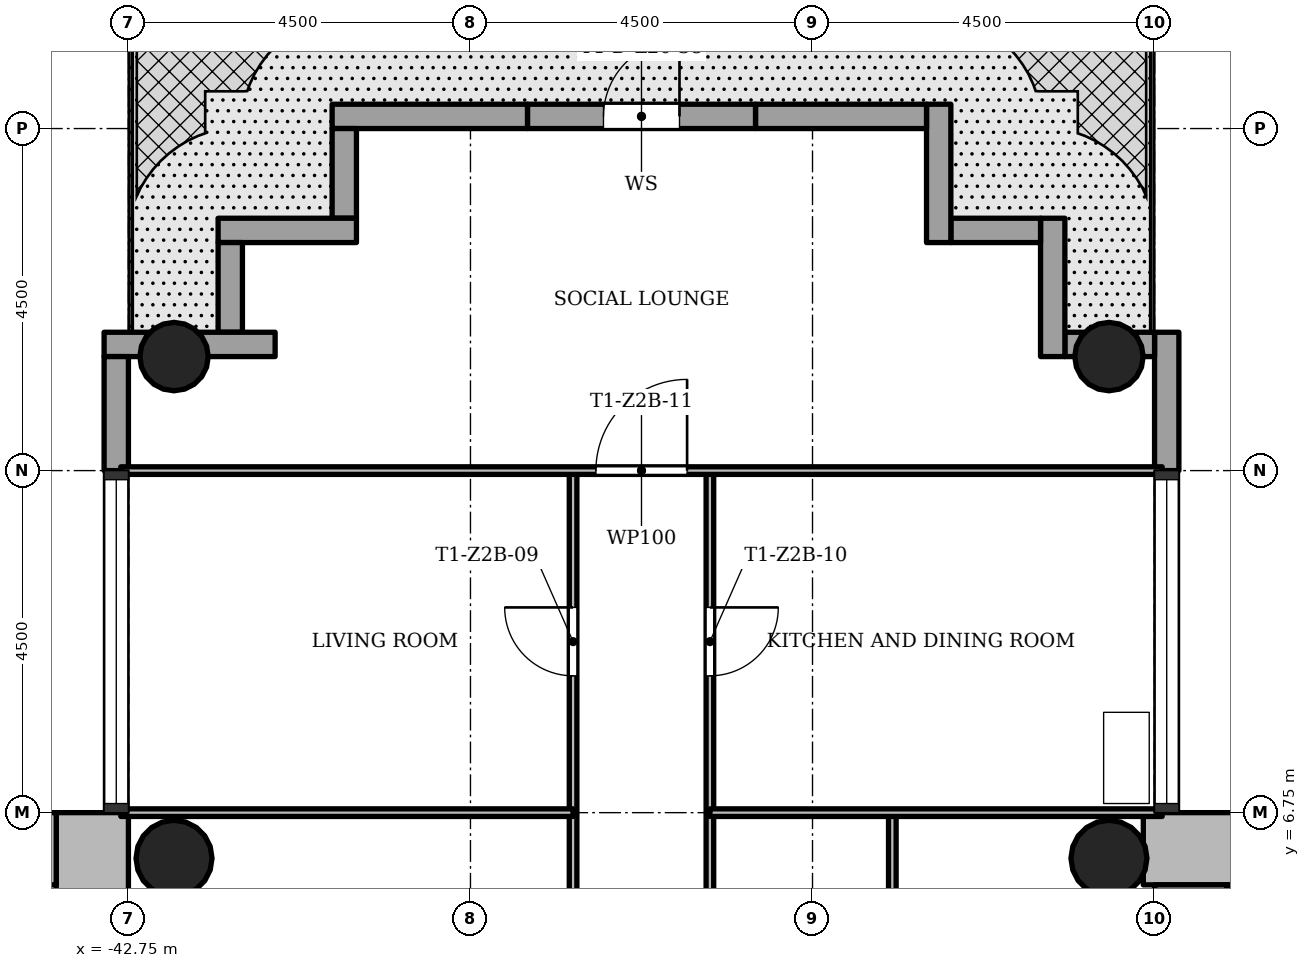
"""IFC4 building model, lengths in metres.
Left out: names, types, materials, properties, quantities, classifications, styles, units other than length and angle.
Written with IfcOpenShell. Run it as: python <this file> out.ifc"""

import sys

from ifc_helpers import new_model, si_unit, direction, frame, frame_2d, origin, origin_2d, place, context, subcontext, project, spatial, rectangle, hollow_circle, extrude, element, fill, save


model = new_model("IFC4")
c1 = context("Model", 3, precision=1e-05, world=origin(), true_north=direction((0.0, 1.0)))
c2 = subcontext(c1, "Body", "Model", "MODEL_VIEW")
j1 = project(units=[si_unit("LENGTHUNIT", "METRE"), si_unit("PLANEANGLEUNIT", "RADIAN")], contexts=[c1])
p1 = place(None, origin())
s1 = spatial("IfcSite", under=j1, at=p1, CompositionType="ELEMENT")
p2 = place(p1, origin())
s2 = spatial("IfcBuilding", under=s1, at=p2, CompositionType="ELEMENT")
p3 = place(p2, frame((0.0, 0.0, 76.6)))
s3 = spatial("IfcBuildingStorey", under=s2, at=p3, CompositionType="ELEMENT", Elevation=76.6)
p4 = place(p3, frame((-20.702, 6.275, 0.0), z_axis=(0.0, 0.0, 1.0), x_axis=(-1.0, 0.0, 0.0)))
e1 = element("IfcWall", 1, at=p4, inside=s3, PredefinedType="SHEAR", context=c2, shape_type="SweptSolid", body=[
    extrude(rectangle(XDim=8.696, YDim=0.95, at=frame_2d((4.348, 0.0))), origin(), (0.0, 0.0, 1.0), 3.4),
])
p5 = place(p3, frame((-28.775, 5.8, 0.0), z_axis=(0.0, 0.0, 1.0), x_axis=(0.0, -1.0, 0.0)))
e2 = element("IfcWall", 2, at=p5, inside=s3, PredefinedType="SHEAR", context=c2, shape_type="SweptSolid", body=[
    extrude(rectangle(XDim=12.55, YDim=0.95, at=frame_2d((6.275, 0.0))), origin(), (0.0, 0.0, 1.0), 3.4),
])
p6 = place(p5, frame((4.9, 0.0, 0.0)))
e3 = element("IfcOpeningElement", 3, at=p6, cuts=e2, PredefinedType="OPENING", context=c2, shape_type="SweptSolid", body=[
    extrude(rectangle(XDim=1.8, YDim=2.1, at=frame_2d((0.9, 1.05))), frame((0.0, 0.485, 0.0), z_axis=(0.0, -1.0, 0.0), x_axis=(1.0, 0.0, 0.0)), (0.0, 0.0, 1.0), 0.97),
])
p7 = place(p3, frame((-43.225, -5.8, 0.0), z_axis=(0.0, 0.0, 1.0), x_axis=(0.0, 1.0, 0.0)))
e4 = element("IfcWall", 4, at=p7, inside=s3, PredefinedType="SHEAR", context=c2, shape_type="SweptSolid", body=[
    extrude(rectangle(XDim=12.55, YDim=0.95, at=frame_2d((6.275, 0.0))), origin(), (0.0, 0.0, 1.0), 3.4),
])
p8 = place(p7, frame((4.9, 0.0, 0.0)))
e5 = element("IfcOpeningElement", 5, at=p8, cuts=e4, PredefinedType="OPENING", context=c2, shape_type="SweptSolid", body=[
    extrude(rectangle(XDim=1.8, YDim=2.1, at=frame_2d((0.9, 1.05))), frame((0.0, 0.485, 0.0), z_axis=(0.0, -1.0, 0.0), x_axis=(1.0, 0.0, 0.0)), (0.0, 0.0, 1.0), 0.97),
])
p9 = place(p3, frame((-43.7, 6.275, 0.0), z_axis=(0.0, 0.0, 1.0), x_axis=(-1.0, 0.0, 0.0)))
e6 = element("IfcWall", 6, at=p9, inside=s3, PredefinedType="SHEAR", context=c2, shape_type="SweptSolid", body=[
    extrude(rectangle(XDim=8.05, YDim=0.95, at=frame_2d((4.025, 0.0))), origin(), (0.0, 0.0, 1.0), 3.4),
])
for number, where, z_axis, x_axis in (
    (7, (-29.85, 12.75, 0.0), (0.0, 0.0, 1.0), (1.0, 0.0, 0.0)),
    (8, (-42.15, 12.75, 0.0), (0.0, 0.0, 1.0), (1.0, 0.0, 0.0)),
):
    element("IfcColumn", number, at=place(p3, frame(where, z_axis=z_axis, x_axis=x_axis)), inside=s3, PredefinedType="COLUMN", context=c2, shape_type="SweptSolid", body=[
        extrude(hollow_circle(Radius=0.45, WallThickness=0.032, at=origin_2d()), origin(), (0.0, 0.0, 1.0), 3.4),
    ])
for number, where, z_axis, x_axis in (
    (9, (-29.85, 6.15, 0.0), (0.0, 0.0, 1.0), (1.0, 0.0, 0.0)),
    (10, (-42.15, 6.15, 0.0), (0.0, 0.0, 1.0), (1.0, 0.0, 0.0)),
):
    element("IfcColumn", number, at=place(p3, frame(where, z_axis=z_axis, x_axis=x_axis)), inside=s3, PredefinedType="COLUMN", context=c2, shape_type="SweptSolid", body=[
        extrude(hollow_circle(Radius=0.5, WallThickness=0.036, at=origin_2d()), origin(), (0.0, 0.0, 1.0), 3.4),
    ])
p10 = place(p3, frame((-29.09, 11.25, 0.0), z_axis=(0.0, 0.0, 1.0), x_axis=(0.0, 1.0, 0.0)))
e11 = element("IfcWall", 11, at=p10, inside=s3, PredefinedType="STANDARD", context=c2, shape_type="SweptSolid", body=[
    extrude(rectangle(XDim=1.82, YDim=0.32, at=frame_2d((0.91, 0.0))), origin(), (0.0, 0.0, 1.0), 3.1),
])
p11 = place(p3, frame((-29.25, 12.91, -0.02), z_axis=(0.0, 0.0, 1.0), x_axis=(-1.0, 0.0, 0.0)))
e12 = element("IfcWall", 12, at=p11, inside=s3, PredefinedType="STANDARD", context=c2, shape_type="SweptSolid", body=[
    extrude(rectangle(XDim=1.18, YDim=0.32, at=frame_2d((0.59, 0.0))), origin(), (0.0, 0.0, 1.0), 3.12),
])
p12 = place(p3, frame((-30.59, 12.75, -0.02), z_axis=(0.0, 0.0, 1.0), x_axis=(0.0, 1.0, 0.0)))
e13 = element("IfcWall", 13, at=p12, inside=s3, PredefinedType="STANDARD", context=c2, shape_type="SweptSolid", body=[
    extrude(rectangle(XDim=1.82, YDim=0.32, at=frame_2d((0.91, 0.0))), origin(), (0.0, 0.0, 1.0), 3.12),
])
p13 = place(p3, frame((-30.75, 14.41, -0.02), z_axis=(0.0, 0.0, 1.0), x_axis=(-1.0, 0.0, 0.0)))
e14 = element("IfcWall", 14, at=p13, inside=s3, PredefinedType="STANDARD", context=c2, shape_type="SweptSolid", body=[
    extrude(rectangle(XDim=1.18, YDim=0.32, at=frame_2d((0.59, 0.0))), origin(), (0.0, 0.0, 1.0), 3.12),
])
p14 = place(p3, frame((-32.09, 14.25, -0.02), z_axis=(0.0, 0.0, 1.0), x_axis=(0.0, 1.0, 0.0)))
e15 = element("IfcWall", 15, at=p14, inside=s3, PredefinedType="STANDARD", context=c2, shape_type="SweptSolid", body=[
    extrude(rectangle(XDim=1.82, YDim=0.32, at=frame_2d((0.91, 0.0))), origin(), (0.0, 0.0, 1.0), 3.12),
])
p15 = place(p3, frame((-32.25, 15.91, -0.02), z_axis=(0.0, 0.0, 1.0), x_axis=(-1.0, 0.0, 0.0)))
e16 = element("IfcWall", 16, at=p15, inside=s3, PredefinedType="STANDARD", context=c2, shape_type="SweptSolid", body=[
    extrude(rectangle(XDim=2.25, YDim=0.32, at=frame_2d((1.125, 0.0))), origin(), (0.0, 0.0, 1.0), 3.12),
])
p16 = place(p3, frame((-34.5, 15.91, -0.02), z_axis=(0.0, 0.0, 1.0), x_axis=(-1.0, 0.0, 0.0)))
e17 = element("IfcWall", 17, at=p16, inside=s3, PredefinedType="STANDARD", context=c2, shape_type="SweptSolid", body=[
    extrude(rectangle(XDim=3.0, YDim=0.32, at=frame_2d((1.5, 0.0))), origin(), (0.0, 0.0, 1.0), 3.12),
])
p17 = place(p16, frame((1.0, 0.0, 0.02)))
e18 = element("IfcOpeningElement", 18, at=p17, cuts=e17, PredefinedType="OPENING", context=c2, shape_type="SweptSolid", body=[
    extrude(rectangle(XDim=1.0, YDim=2.1, at=frame_2d((0.5, 1.05))), frame((0.0, 0.17, 0.0), z_axis=(0.0, -1.0, 0.0), x_axis=(1.0, 0.0, 0.0)), (0.0, 0.0, 1.0), 0.34),
])
p18 = place(p3, frame((-37.5, 15.91, -0.02), z_axis=(0.0, 0.0, 1.0), x_axis=(-1.0, 0.0, 0.0)))
e19 = element("IfcWall", 19, at=p18, inside=s3, PredefinedType="STANDARD", context=c2, shape_type="SweptSolid", body=[
    extrude(rectangle(XDim=2.57, YDim=0.32, at=frame_2d((1.285, 0.0))), origin(), (0.0, 0.0, 1.0), 3.12),
])
p19 = place(p3, frame((-39.91, 15.75, -0.02), z_axis=(0.0, 0.0, 1.0), x_axis=(0.0, -1.0, 0.0)))
e20 = element("IfcWall", 20, at=p19, inside=s3, PredefinedType="STANDARD", context=c2, shape_type="SweptSolid", body=[
    extrude(rectangle(XDim=1.18, YDim=0.32, at=frame_2d((0.59, 0.0))), origin(), (0.0, 0.0, 1.0), 3.12),
])
p20 = place(p3, frame((-39.75, 14.41, -0.02), z_axis=(0.0, 0.0, 1.0), x_axis=(-1.0, 0.0, 0.0)))
e21 = element("IfcWall", 21, at=p20, inside=s3, PredefinedType="STANDARD", context=c2, shape_type="SweptSolid", body=[
    extrude(rectangle(XDim=1.82, YDim=0.32, at=frame_2d((0.91, 0.0))), origin(), (0.0, 0.0, 1.0), 3.12),
])
p21 = place(p3, frame((-41.41, 14.25, -0.02), z_axis=(0.0, 0.0, 1.0), x_axis=(0.0, -1.0, 0.0)))
e22 = element("IfcWall", 22, at=p21, inside=s3, PredefinedType="STANDARD", context=c2, shape_type="SweptSolid", body=[
    extrude(rectangle(XDim=1.18, YDim=0.32, at=frame_2d((0.59, 0.0))), origin(), (0.0, 0.0, 1.0), 3.12),
])
p22 = place(p3, frame((-40.82, 12.91, -0.02), z_axis=(0.0, 0.0, 1.0), x_axis=(-1.0, 0.0, 0.0)))
e23 = element("IfcWall", 23, at=p22, inside=s3, PredefinedType="STANDARD", context=c2, shape_type="SweptSolid", body=[
    extrude(rectangle(XDim=2.25, YDim=0.32, at=frame_2d((1.125, 0.0))), origin(), (0.0, 0.0, 1.0), 3.12),
])
p23 = place(p3, frame((-42.91, 12.75, 0.0), z_axis=(0.0, 0.0, 1.0), x_axis=(0.0, -1.0, 0.0)))
e24 = element("IfcWall", 24, at=p23, inside=s3, PredefinedType="STANDARD", context=c2, shape_type="SweptSolid", body=[
    extrude(rectangle(XDim=1.5, YDim=0.32, at=frame_2d((0.75, 0.0))), origin(), (0.0, 0.0, 1.0), 3.1),
])
p24 = place(p3, frame((-36.9, 1.5, 0.0), z_axis=(0.0, 0.0, 1.0), x_axis=(0.0, 1.0, 0.0)))
e25 = element("IfcWall", 25, at=p24, inside=s3, PredefinedType="PARTITIONING", context=c2, shape_type="SweptSolid", body=[
    extrude(rectangle(XDim=9.75, YDim=0.1, at=frame_2d((4.875, 0.0))), origin(), (0.0, 0.0, 1.0), 3.0),
])
p25 = place(p24, frame((0.75, 0.0, 0.0)))
e26 = element("IfcOpeningElement", 26, at=p25, cuts=e25, PredefinedType="OPENING", context=c2, shape_type="SweptSolid", body=[
    extrude(rectangle(XDim=0.9, YDim=2.1, at=frame_2d((0.45, 1.05))), frame((0.0, 0.06, 0.0), z_axis=(0.0, -1.0, 0.0), x_axis=(1.0, 0.0, 0.0)), (0.0, 0.0, 1.0), 0.12),
])
p26 = place(p24, frame((7.05, 0.0, 0.0)))
e27 = element("IfcOpeningElement", 27, at=p26, cuts=e25, PredefinedType="OPENING", context=c2, shape_type="SweptSolid", body=[
    extrude(rectangle(XDim=0.9, YDim=2.1, at=frame_2d((0.45, 1.05))), frame((0.0, 0.06, 0.0), z_axis=(0.0, -1.0, 0.0), x_axis=(1.0, 0.0, 0.0)), (0.0, 0.0, 1.0), 0.12),
])
p27 = place(p3, frame((-35.1, 1.5, 0.0), z_axis=(0.0, 0.0, 1.0), x_axis=(0.0, 1.0, 0.0)))
e28 = element("IfcWall", 28, at=p27, inside=s3, PredefinedType="PARTITIONING", context=c2, shape_type="SweptSolid", body=[
    extrude(rectangle(XDim=9.75, YDim=0.1, at=frame_2d((4.875, 0.0))), origin(), (0.0, 0.0, 1.0), 3.0),
])
p28 = place(p27, frame((2.175, 0.0, 0.0)))
e29 = element("IfcOpeningElement", 29, at=p28, cuts=e28, PredefinedType="OPENING", context=c2, shape_type="SweptSolid", body=[
    extrude(rectangle(XDim=0.9, YDim=2.1, at=frame_2d((0.45, 1.05))), frame((0.0, 0.06, 0.0), z_axis=(0.0, -1.0, 0.0), x_axis=(1.0, 0.0, 0.0)), (0.0, 0.0, 1.0), 0.12),
])
p29 = place(p27, frame((7.05, 0.0, 0.0)))
e30 = element("IfcOpeningElement", 30, at=p29, cuts=e28, PredefinedType="OPENING", context=c2, shape_type="SweptSolid", body=[
    extrude(rectangle(XDim=0.9, YDim=2.1, at=frame_2d((0.45, 1.05))), frame((0.0, 0.06, 0.0), z_axis=(0.0, -1.0, 0.0), x_axis=(1.0, 0.0, 0.0)), (0.0, 0.0, 1.0), 0.12),
])
p30 = place(p3, frame((-32.7, 1.5, 0.0), z_axis=(0.0, 0.0, 1.0), x_axis=(0.0, 1.0, 0.0)))
e31 = element("IfcWall", 31, at=p30, inside=s3, PredefinedType="PARTITIONING", context=c2, shape_type="SweptSolid", body=[
    extrude(rectangle(XDim=5.25, YDim=0.1, at=frame_2d((2.625, 0.0))), origin(), (0.0, 0.0, 1.0), 3.0),
])
for number, where, z_axis, x_axis in (
    (32, (-42.85, 6.75, 0.0), (0.0, 0.0, 1.0), (1.0, 0.0, 0.0)),
    (33, (-35.1, 6.75, 0.0), (0.0, 0.0, 1.0), (1.0, 0.0, 0.0)),
):
    element("IfcWall", number, at=place(p3, frame(where, z_axis=z_axis, x_axis=x_axis)), inside=s3, PredefinedType="PARTITIONING", context=c2, shape_type="SweptSolid", body=[
        extrude(rectangle(XDim=5.95, YDim=0.1, at=frame_2d((2.975, 0.0))), origin(), (0.0, 0.0, 1.0), 3.0),
    ])
p31 = place(p3, frame((-42.85, 11.25, 0.0), z_axis=(0.0, 0.0, 1.0), x_axis=(1.0, 0.0, 0.0)))
e34 = element("IfcWall", 34, at=p31, inside=s3, PredefinedType="PARTITIONING", context=c2, shape_type="SweptSolid", body=[
    extrude(rectangle(XDim=13.7, YDim=0.1, at=frame_2d((6.85, 0.0))), origin(), (0.0, 0.0, 1.0), 3.0),
])
p32 = place(p31, frame((6.25, 0.0, 0.0)))
e35 = element("IfcOpeningElement", 35, at=p32, cuts=e34, PredefinedType="OPENING", context=c2, shape_type="SweptSolid", body=[
    extrude(rectangle(XDim=1.2, YDim=2.1, at=frame_2d((0.6, 1.05))), frame((0.0, 0.06, 0.0), z_axis=(0.0, -1.0, 0.0), x_axis=(1.0, 0.0, 0.0)), (0.0, 0.0, 1.0), 0.12),
])
p33 = place(p3, frame((-28.175, 1.9, 0.0), z_axis=(0.0, 0.0, 1.0), x_axis=(0.0, 1.0, 0.0)))
e36 = element("IfcWall", 36, at=p33, inside=s3, PredefinedType="SHEAR", context=c2, shape_type="SweptSolid", body=[
    extrude(rectangle(XDim=3.9, YDim=0.25, at=frame_2d((1.95, 0.0))), origin(), (0.0, 0.0, 1.0), 3.4),
])
p34 = place(p17, origin())
e37 = element("IfcDoor", 37, at=p34, inside=s3, OperationType="SINGLE_SWING_LEFT", PredefinedType="DOOR", context=c2, shape_type="SweptSolid", body=[
    extrude(rectangle(XDim=1.0, YDim=2.1, at=frame_2d((0.5, 1.05))), frame((0.0, 0.025, 0.0), z_axis=(0.0, -1.0, 0.0), x_axis=(1.0, 0.0, 0.0)), (0.0, 0.0, 1.0), 0.05),
])
fill(e18, e37)
p35 = place(p26, origin())
e38 = element("IfcDoor", 38, at=p35, inside=s3, OperationType="SINGLE_SWING_LEFT", PredefinedType="DOOR", context=c2, shape_type="SweptSolid", body=[
    extrude(rectangle(XDim=0.9, YDim=2.1, at=frame_2d((0.45, 1.05))), frame((0.0, 0.025, 0.0), z_axis=(0.0, -1.0, 0.0), x_axis=(1.0, 0.0, 0.0)), (0.0, 0.0, 1.0), 0.05),
])
fill(e27, e38)
p36 = place(p29, origin())
e39 = element("IfcDoor", 39, at=p36, inside=s3, OperationType="SINGLE_SWING_RIGHT", PredefinedType="DOOR", context=c2, shape_type="SweptSolid", body=[
    extrude(rectangle(XDim=0.9, YDim=2.1, at=frame_2d((0.45, 1.05))), frame((0.0, 0.025, 0.0), z_axis=(0.0, -1.0, 0.0), x_axis=(1.0, 0.0, 0.0)), (0.0, 0.0, 1.0), 0.05),
])
fill(e30, e39)
p37 = place(p32, origin())
e40 = element("IfcDoor", 40, at=p37, inside=s3, OperationType="SINGLE_SWING_LEFT", PredefinedType="DOOR", context=c2, shape_type="SweptSolid", body=[
    extrude(rectangle(XDim=1.2, YDim=2.1, at=frame_2d((0.6, 1.05))), frame((0.0, 0.025, 0.0), z_axis=(0.0, -1.0, 0.0), x_axis=(1.0, 0.0, 0.0)), (0.0, 0.0, 1.0), 0.05),
])
fill(e35, e40)
save(model, sys.argv[1])
